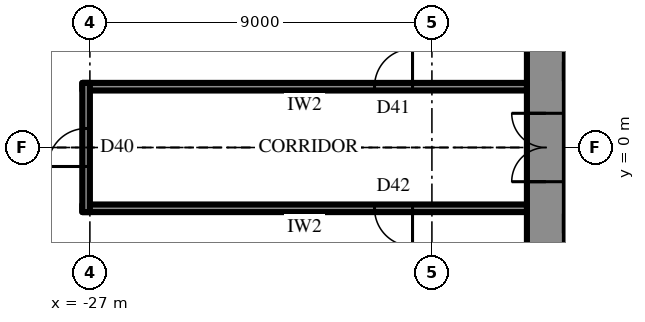
"""IFC4 building model, lengths in metres.
Left out: names, types, materials, properties, quantities, classifications, styles, units other than length and angle.
Written with IfcOpenShell. Run it as: python <this file> out.ifc"""

import sys

from ifc_helpers import new_model, si_unit, direction, frame, frame_2d, origin, place, context, subcontext, project, spatial, rectangle, extrude, element, fill, save


model = new_model("IFC4")
c1 = context("Model", 3, precision=1e-05, world=origin(), true_north=direction((0.0, 1.0)))
c2 = subcontext(c1, "Body", "Model", "MODEL_VIEW")
j1 = project(units=[si_unit("LENGTHUNIT", "METRE"), si_unit("PLANEANGLEUNIT", "RADIAN")], contexts=[c1])
p1 = place(None, origin())
s1 = spatial("IfcSite", under=j1, at=p1, CompositionType="ELEMENT")
p2 = place(p1, origin())
s2 = spatial("IfcBuilding", under=s1, at=p2, CompositionType="ELEMENT")
p3 = place(p2, frame((0.0, 0.0, 257.5)))
s3 = spatial("IfcBuildingStorey", under=s2, at=p3, CompositionType="ELEMENT", Elevation=257.5)
p4 = place(p3, frame((-15.0, 10.7, 0.0), z_axis=(0.0, 0.0, 1.0), x_axis=(0.0, -1.0, 0.0)))
e1 = element("IfcWall", 1, at=p4, inside=s3, PredefinedType="SHEAR", context=c2, shape_type="SweptSolid", body=[
    extrude(rectangle(XDim=21.4, YDim=1.0, at=frame_2d((10.7, 0.0))), origin(), (0.0, 0.0, 1.0), 4.2),
])
p5 = place(p4, frame((9.8, 0.0, 0.0)))
e2 = element("IfcOpeningElement", 2, at=p5, cuts=e1, PredefinedType="OPENING", context=c2, shape_type="SweptSolid", body=[
    extrude(rectangle(XDim=1.8, YDim=2.4, at=frame_2d((0.9, 1.2))), frame((0.0, 0.51, 0.0), z_axis=(0.0, -1.0, 0.0), x_axis=(1.0, 0.0, 0.0)), (0.0, 0.0, 1.0), 1.02),
])
p6 = place(p3, frame((-12.3, -2.0, 0.0), z_axis=(0.0, 0.0, 1.0), x_axis=(-1.0, 0.0, 0.0)))
e3 = element("IfcWall", 3, at=p6, inside=s3, PredefinedType="SHEAR", context=c2, shape_type="SweptSolid", body=[
    extrude(rectangle(XDim=2.2, YDim=0.5, at=frame_2d((1.1, 0.0))), origin(), (0.0, 0.0, 1.0), 4.2),
])
p7 = place(p6, frame((0.8, 0.0, 0.0)))
e4 = element("IfcOpeningElement", 4, at=p7, cuts=e3, PredefinedType="OPENING", context=c2, shape_type="SweptSolid", body=[
    extrude(rectangle(XDim=0.9, YDim=2.2, at=frame_2d((0.45, 1.1))), frame((0.0, 0.26, 0.0), z_axis=(0.0, -1.0, 0.0), x_axis=(1.0, 0.0, 0.0)), (0.0, 0.0, 1.0), 0.52),
])
p8 = place(p3, frame((-15.5, 1.6, 0.0), z_axis=(0.0, 0.0, 1.0), x_axis=(-1.0, 0.0, 0.0)))
e5 = element("IfcWall", 5, at=p8, inside=s3, PredefinedType="PARTITIONING", context=c2, shape_type="SweptSolid", body=[
    extrude(rectangle(XDim=11.7, YDim=0.2, at=frame_2d((5.85, 0.0))), origin(), (0.0, 0.0, 1.0), 4.0),
])
p9 = place(p8, frame((3.01, 0.0, 0.0)))
e6 = element("IfcOpeningElement", 6, at=p9, cuts=e5, PredefinedType="OPENING", context=c2, shape_type="SweptSolid", body=[
    extrude(rectangle(XDim=1.0, YDim=2.2, at=frame_2d((0.5, 1.1))), frame((0.0, 0.11, 0.0), z_axis=(0.0, -1.0, 0.0), x_axis=(1.0, 0.0, 0.0)), (0.0, 0.0, 1.0), 0.22),
])
p10 = place(p3, frame((-15.5, -1.6, 0.0), z_axis=(0.0, 0.0, 1.0), x_axis=(-1.0, 0.0, 0.0)))
e7 = element("IfcWall", 7, at=p10, inside=s3, PredefinedType="PARTITIONING", context=c2, shape_type="SweptSolid", body=[
    extrude(rectangle(XDim=11.7, YDim=0.2, at=frame_2d((5.85, 0.0))), origin(), (0.0, 0.0, 1.0), 4.0),
])
p11 = place(p10, frame((3.01, 0.0, 0.0)))
e8 = element("IfcOpeningElement", 8, at=p11, cuts=e7, PredefinedType="OPENING", context=c2, shape_type="SweptSolid", body=[
    extrude(rectangle(XDim=1.0, YDim=2.2, at=frame_2d((0.5, 1.1))), frame((0.0, 0.11, 0.0), z_axis=(0.0, -1.0, 0.0), x_axis=(1.0, 0.0, 0.0)), (0.0, 0.0, 1.0), 0.22),
])
p12 = place(p3, frame((-27.1, -1.7, 0.0), z_axis=(0.0, 0.0, 1.0), x_axis=(0.0, 1.0, 0.0)))
e9 = element("IfcWall", 9, at=p12, inside=s3, PredefinedType="PARTITIONING", context=c2, shape_type="SweptSolid", body=[
    extrude(rectangle(XDim=3.4, YDim=0.2, at=frame_2d((1.7, 0.0))), origin(), (0.0, 0.0, 1.0), 4.0),
])
p13 = place(p12, frame((1.2, 0.0, 0.0)))
e10 = element("IfcOpeningElement", 10, at=p13, cuts=e9, PredefinedType="OPENING", context=c2, shape_type="SweptSolid", body=[
    extrude(rectangle(XDim=1.0, YDim=2.2, at=frame_2d((0.5, 1.1))), frame((0.0, 0.11, 0.0), z_axis=(0.0, -1.0, 0.0), x_axis=(1.0, 0.0, 0.0)), (0.0, 0.0, 1.0), 0.22),
])
p14 = place(p5, frame((1.8, 0.0, 0.0), z_axis=(0.0, 0.0, 1.0), x_axis=(-1.0, 0.0, 0.0)))
e11 = element("IfcDoor", 11, at=p14, inside=s3, OperationType="DOUBLE_DOOR_SINGLE_SWING", PredefinedType="DOOR", context=c2, shape_type="SweptSolid", body=[
    extrude(rectangle(XDim=1.8, YDim=2.4, at=frame_2d((0.9, 1.2))), frame((0.0, 0.025, 0.0), z_axis=(0.0, -1.0, 0.0), x_axis=(1.0, 0.0, 0.0)), (0.0, 0.0, 1.0), 0.05),
])
fill(e2, e11)
p15 = place(p9, frame((1.0, 0.0, 0.0), z_axis=(0.0, 0.0, 1.0), x_axis=(-1.0, 0.0, 0.0)))
e12 = element("IfcDoor", 12, at=p15, inside=s3, OperationType="SINGLE_SWING_LEFT", PredefinedType="DOOR", context=c2, shape_type="SweptSolid", body=[
    extrude(rectangle(XDim=1.0, YDim=2.2, at=frame_2d((0.5, 1.1))), frame((0.0, 0.025, 0.0), z_axis=(0.0, -1.0, 0.0), x_axis=(1.0, 0.0, 0.0)), (0.0, 0.0, 1.0), 0.05),
])
fill(e6, e12)
p16 = place(p11, origin())
e13 = element("IfcDoor", 13, at=p16, inside=s3, OperationType="SINGLE_SWING_RIGHT", PredefinedType="DOOR", context=c2, shape_type="SweptSolid", body=[
    extrude(rectangle(XDim=1.0, YDim=2.2, at=frame_2d((0.5, 1.1))), frame((0.0, 0.025, 0.0), z_axis=(0.0, -1.0, 0.0), x_axis=(1.0, 0.0, 0.0)), (0.0, 0.0, 1.0), 0.05),
])
fill(e8, e13)
p17 = place(p13, origin())
e14 = element("IfcDoor", 14, at=p17, inside=s3, OperationType="SINGLE_SWING_RIGHT", PredefinedType="DOOR", context=c2, shape_type="SweptSolid", body=[
    extrude(rectangle(XDim=1.0, YDim=2.2, at=frame_2d((0.5, 1.1))), frame((0.0, 0.025, 0.0), z_axis=(0.0, -1.0, 0.0), x_axis=(1.0, 0.0, 0.0)), (0.0, 0.0, 1.0), 0.05),
])
fill(e10, e14)
save(model, sys.argv[1])
